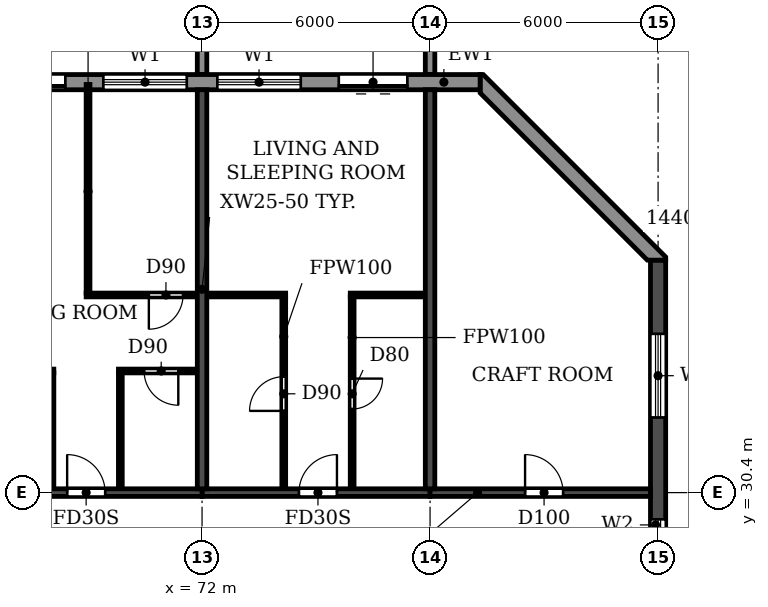
"""IFC4 building model, lengths in metres.
Left out: names, types, materials, properties, quantities, classifications, styles, units other than length and angle.
Written with IfcOpenShell. Run it as: python <this file> out.ifc"""

import sys

from ifc_helpers import new_model, si_unit, direction, frame, frame_2d, origin, place, context, subcontext, project, spatial, polyline, rectangle, outline, extrude, source, transform, mapped, element, fill, save


model = new_model("IFC4")
c1 = context("Model", 3, precision=1e-05, world=origin(), true_north=direction((0.0, 1.0)))
c2 = subcontext(c1, "Body", "Model", "MODEL_VIEW")
j1 = project(units=[si_unit("LENGTHUNIT", "METRE"), si_unit("PLANEANGLEUNIT", "RADIAN")], contexts=[c1])
p1 = place(None, origin())
s1 = spatial("IfcSite", under=j1, at=p1, CompositionType="ELEMENT")
p2 = place(p1, origin())
s2 = spatial("IfcBuilding", under=s1, at=p2, CompositionType="ELEMENT")
p3 = place(p2, frame((0.0, 0.0, 181.8)))
s3 = spatial("IfcBuildingStorey", under=s2, at=p3, CompositionType="ELEMENT", Elevation=181.8)
for number, where, z_axis, x_axis in (
    (1, (72.0, 30.5, 0.0), (0.0, 0.0, 1.0), (0.0, 1.0, 0.0)),
    (2, (78.0, 30.5, 0.0), (0.0, 0.0, 1.0), (0.0, 1.0, 0.0)),
):
    element("IfcWall", number, at=place(p3, frame(where, z_axis=z_axis, x_axis=x_axis)), inside=s3, PredefinedType="SHEAR", context=c2, shape_type="SweptSolid", body=[
        extrude(rectangle(XDim=10.5, YDim=0.25, at=frame_2d((5.25, 0.0))), origin(), (0.0, 0.0, 1.0), 3.08),
    ])
p4 = place(p3, frame((84.0, 4.683, 0.0), z_axis=(0.0, 0.0, 1.0), x_axis=(0.0, 1.0, 0.0)))
e3 = element("IfcWall", 3, at=p4, inside=s3, PredefinedType="SHEAR", context=c2, shape_type="SweptSolid", body=[
    extrude(rectangle(XDim=31.834, YDim=0.4, at=frame_2d((15.917, 0.0))), origin(), (0.0, 0.0, 1.0), 3.08),
])
p5 = place(p4, frame((23.817, 0.0, 0.9)))
e4 = element("IfcOpeningElement", 4, at=p5, cuts=e3, PredefinedType="OPENING", context=c2, shape_type="SweptSolid", body=[
    extrude(rectangle(XDim=1.2, YDim=1.5, at=frame_2d((0.6, 0.75))), frame((0.0, 0.21, 0.0), z_axis=(0.0, -1.0, 0.0), x_axis=(1.0, 0.0, 0.0)), (0.0, 0.0, 1.0), 0.42),
])
p6 = place(p4, frame((8.017, 0.0, 0.9)))
e5 = element("IfcOpeningElement", 5, at=p6, cuts=e3, PredefinedType="OPENING", context=c2, shape_type="SweptSolid", body=[
    extrude(rectangle(XDim=1.2, YDim=1.5, at=frame_2d((0.6, 0.75))), frame((0.0, 0.21, 0.0), z_axis=(0.0, -1.0, 0.0), x_axis=(1.0, 0.0, 0.0)), (0.0, 0.0, 1.0), 0.42),
])
p7 = place(p4, frame((27.694, 0.0, 0.6)))
e6 = element("IfcOpeningElement", 6, at=p7, cuts=e3, PredefinedType="OPENING", context=c2, shape_type="SweptSolid", body=[
    extrude(rectangle(XDim=2.2, YDim=1.8, at=frame_2d((1.1, 0.9))), frame((0.0, 0.21, 0.0), z_axis=(0.0, -1.0, 0.0), x_axis=(1.0, 0.0, 0.0)), (0.0, 0.0, 1.0), 0.42),
])
p8 = place(p4, frame((2.541, 0.0, 0.6)))
e7 = element("IfcOpeningElement", 7, at=p8, cuts=e3, PredefinedType="OPENING", context=c2, shape_type="SweptSolid", body=[
    extrude(rectangle(XDim=2.2, YDim=1.8, at=frame_2d((1.1, 0.9))), frame((0.0, 0.21, 0.0), z_axis=(0.0, -1.0, 0.0), x_axis=(1.0, 0.0, 0.0)), (0.0, 0.0, 1.0), 0.42),
])
p9 = place(p4, frame((15.917, 0.0, 0.9)))
e8 = element("IfcOpeningElement", 8, at=p9, cuts=e3, PredefinedType="OPENING", context=c2, shape_type="SweptSolid", body=[
    extrude(rectangle(XDim=1.2, YDim=1.5, at=frame_2d((0.6, 0.75))), frame((0.0, 0.21, 0.0), z_axis=(0.0, -1.0, 0.0), x_axis=(1.0, 0.0, 0.0)), (0.0, 0.0, 1.0), 0.42),
])
p10 = place(p3, frame((66.0, 30.4, 0.0), z_axis=(0.0, 0.0, 1.0), x_axis=(1.0, 0.0, 0.0)))
e9 = element("IfcWall", 9, at=p10, inside=s3, PredefinedType="SHEAR", context=c2, shape_type="SweptSolid", body=[
    extrude(rectangle(XDim=6.0, YDim=0.2, at=frame_2d((3.0, 0.0))), origin(), (0.0, 0.0, 1.0), 2.48),
])
p11 = place(p10, frame((2.45, 0.0, 0.0)))
e10 = element("IfcOpeningElement", 10, at=p11, cuts=e9, PredefinedType="OPENING", context=c2, shape_type="SweptSolid", body=[
    extrude(rectangle(XDim=1.0, YDim=2.1, at=frame_2d((0.5, 1.05))), frame((0.0, 0.11, 0.0), z_axis=(0.0, -1.0, 0.0), x_axis=(1.0, 0.0, 0.0)), (0.0, 0.0, 1.0), 0.22),
])
p12 = place(p3, frame((72.0, 30.4, 0.0), z_axis=(0.0, 0.0, 1.0), x_axis=(1.0, 0.0, 0.0)))
e11 = element("IfcWall", 11, at=p12, inside=s3, PredefinedType="SHEAR", context=c2, shape_type="SweptSolid", body=[
    extrude(rectangle(XDim=6.0, YDim=0.2, at=frame_2d((3.0, 0.0))), origin(), (0.0, 0.0, 1.0), 2.48),
])
p13 = place(p12, frame((2.55, 0.0, 0.0)))
e12 = element("IfcOpeningElement", 12, at=p13, cuts=e11, PredefinedType="OPENING", context=c2, shape_type="SweptSolid", body=[
    extrude(rectangle(XDim=1.0, YDim=2.1, at=frame_2d((0.5, 1.05))), frame((0.0, 0.11, 0.0), z_axis=(0.0, -1.0, 0.0), x_axis=(1.0, 0.0, 0.0)), (0.0, 0.0, 1.0), 0.22),
])
p14 = place(p3, frame((78.0, 30.4, 0.0), z_axis=(0.0, 0.0, 1.0), x_axis=(1.0, 0.0, 0.0)))
e13 = element("IfcWall", 13, at=p14, inside=s3, PredefinedType="SHEAR", context=c2, shape_type="SweptSolid", body=[
    extrude(rectangle(XDim=5.8, YDim=0.2, at=frame_2d((2.9, 0.0))), origin(), (0.0, 0.0, 1.0), 2.48),
])
p15 = place(p14, frame((2.5, 0.0, 0.0)))
e14 = element("IfcOpeningElement", 14, at=p15, cuts=e13, PredefinedType="OPENING", context=c2, shape_type="SweptSolid", body=[
    extrude(rectangle(XDim=1.0, YDim=2.1, at=frame_2d((0.5, 1.05))), frame((0.0, 0.11, 0.0), z_axis=(0.0, -1.0, 0.0), x_axis=(1.0, 0.0, 0.0)), (0.0, 0.0, 1.0), 0.22),
])
p16 = place(p3, origin())
e15 = element("IfcWall", 15, at=p16, inside=s3, PredefinedType="STANDARD", context=c2, shape_type="SweptSolid", body=[
    extrude(outline(polyline([(84.2, 36.517), (84.2, 36.6), (79.4, 41.4), (79.317, 41.4), (79.317, 40.917), (83.717, 36.517), (84.2, 36.517)])), origin(), (0.0, 0.0, 1.0), 3.08),
])
p17 = place(p3, frame((79.317, 41.2, 0.0), z_axis=(0.0, 0.0, 1.0), x_axis=(-1.0, 0.0, 0.0)))
e16 = element("IfcWall", 16, at=p17, inside=s3, PredefinedType="STANDARD", context=c2, shape_type="SweptSolid", body=[
    extrude(rectangle(XDim=56.634, YDim=0.4, at=frame_2d((28.317, 0.0))), origin(), (0.0, 0.0, 1.0), 3.08),
])
p18 = place(p17, frame((52.917, 0.0, 0.0)))
e17 = element("IfcOpeningElement", 17, at=p18, cuts=e16, PredefinedType="OPENING", context=c2, shape_type="SweptSolid", body=[
    extrude(rectangle(XDim=1.8, YDim=2.4, at=frame_2d((0.9, 1.2))), frame((0.0, 0.21, 0.0), z_axis=(0.0, -1.0, 0.0), x_axis=(1.0, 0.0, 0.0)), (0.0, 0.0, 1.0), 0.42),
])
p19 = place(p17, frame((49.717, 0.0, 0.9)))
e18 = element("IfcOpeningElement", 18, at=p19, cuts=e16, PredefinedType="OPENING", context=c2, shape_type="SweptSolid", body=[
    extrude(rectangle(XDim=2.2, YDim=1.5, at=frame_2d((1.1, 0.75))), frame((0.0, 0.21, 0.0), z_axis=(0.0, -1.0, 0.0), x_axis=(1.0, 0.0, 0.0)), (0.0, 0.0, 1.0), 0.42),
])
p20 = place(p17, frame((46.717, 0.0, 0.9)))
e19 = element("IfcOpeningElement", 19, at=p20, cuts=e16, PredefinedType="OPENING", context=c2, shape_type="SweptSolid", body=[
    extrude(rectangle(XDim=2.2, YDim=1.5, at=frame_2d((1.1, 0.75))), frame((0.0, 0.21, 0.0), z_axis=(0.0, -1.0, 0.0), x_axis=(1.0, 0.0, 0.0)), (0.0, 0.0, 1.0), 0.42),
])
p21 = place(p17, frame((43.917, 0.0, 0.0)))
e20 = element("IfcOpeningElement", 20, at=p21, cuts=e16, PredefinedType="OPENING", context=c2, shape_type="SweptSolid", body=[
    extrude(rectangle(XDim=1.8, YDim=2.4, at=frame_2d((0.9, 1.2))), frame((0.0, 0.21, 0.0), z_axis=(0.0, -1.0, 0.0), x_axis=(1.0, 0.0, 0.0)), (0.0, 0.0, 1.0), 0.42),
])
p22 = place(p17, frame((40.717, 0.0, 0.9)))
e21 = element("IfcOpeningElement", 21, at=p22, cuts=e16, PredefinedType="OPENING", context=c2, shape_type="SweptSolid", body=[
    extrude(rectangle(XDim=2.2, YDim=1.5, at=frame_2d((1.1, 0.75))), frame((0.0, 0.21, 0.0), z_axis=(0.0, -1.0, 0.0), x_axis=(1.0, 0.0, 0.0)), (0.0, 0.0, 1.0), 0.42),
])
p23 = place(p17, frame((37.717, 0.0, 0.9)))
e22 = element("IfcOpeningElement", 22, at=p23, cuts=e16, PredefinedType="OPENING", context=c2, shape_type="SweptSolid", body=[
    extrude(rectangle(XDim=2.2, YDim=1.5, at=frame_2d((1.1, 0.75))), frame((0.0, 0.21, 0.0), z_axis=(0.0, -1.0, 0.0), x_axis=(1.0, 0.0, 0.0)), (0.0, 0.0, 1.0), 0.42),
])
p24 = place(p17, frame((34.917, 0.0, 0.0)))
e23 = element("IfcOpeningElement", 23, at=p24, cuts=e16, PredefinedType="OPENING", context=c2, shape_type="SweptSolid", body=[
    extrude(rectangle(XDim=1.8, YDim=2.4, at=frame_2d((0.9, 1.2))), frame((0.0, 0.21, 0.0), z_axis=(0.0, -1.0, 0.0), x_axis=(1.0, 0.0, 0.0)), (0.0, 0.0, 1.0), 0.42),
])
p25 = place(p17, frame((31.717, 0.0, 0.9)))
e24 = element("IfcOpeningElement", 24, at=p25, cuts=e16, PredefinedType="OPENING", context=c2, shape_type="SweptSolid", body=[
    extrude(rectangle(XDim=2.2, YDim=1.5, at=frame_2d((1.1, 0.75))), frame((0.0, 0.21, 0.0), z_axis=(0.0, -1.0, 0.0), x_axis=(1.0, 0.0, 0.0)), (0.0, 0.0, 1.0), 0.42),
])
p26 = place(p17, frame((28.717, 0.0, 0.9)))
e25 = element("IfcOpeningElement", 25, at=p26, cuts=e16, PredefinedType="OPENING", context=c2, shape_type="SweptSolid", body=[
    extrude(rectangle(XDim=2.2, YDim=1.5, at=frame_2d((1.1, 0.75))), frame((0.0, 0.21, 0.0), z_axis=(0.0, -1.0, 0.0), x_axis=(1.0, 0.0, 0.0)), (0.0, 0.0, 1.0), 0.42),
])
p27 = place(p17, frame((25.717, 0.0, 0.9)))
e26 = element("IfcOpeningElement", 26, at=p27, cuts=e16, PredefinedType="OPENING", context=c2, shape_type="SweptSolid", body=[
    extrude(rectangle(XDim=2.2, YDim=1.5, at=frame_2d((1.1, 0.75))), frame((0.0, 0.21, 0.0), z_axis=(0.0, -1.0, 0.0), x_axis=(1.0, 0.0, 0.0)), (0.0, 0.0, 1.0), 0.42),
])
p28 = place(p17, frame((22.917, 0.0, 0.0)))
e27 = element("IfcOpeningElement", 27, at=p28, cuts=e16, PredefinedType="OPENING", context=c2, shape_type="SweptSolid", body=[
    extrude(rectangle(XDim=1.8, YDim=2.4, at=frame_2d((0.9, 1.2))), frame((0.0, 0.21, 0.0), z_axis=(0.0, -1.0, 0.0), x_axis=(1.0, 0.0, 0.0)), (0.0, 0.0, 1.0), 0.42),
])
p29 = place(p17, frame((19.717, 0.0, 0.9)))
e28 = element("IfcOpeningElement", 28, at=p29, cuts=e16, PredefinedType="OPENING", context=c2, shape_type="SweptSolid", body=[
    extrude(rectangle(XDim=2.2, YDim=1.5, at=frame_2d((1.1, 0.75))), frame((0.0, 0.21, 0.0), z_axis=(0.0, -1.0, 0.0), x_axis=(1.0, 0.0, 0.0)), (0.0, 0.0, 1.0), 0.42),
])
p30 = place(p17, frame((16.917, 0.0, 0.0)))
e29 = element("IfcOpeningElement", 29, at=p30, cuts=e16, PredefinedType="OPENING", context=c2, shape_type="SweptSolid", body=[
    extrude(rectangle(XDim=1.8, YDim=2.4, at=frame_2d((0.9, 1.2))), frame((0.0, 0.21, 0.0), z_axis=(0.0, -1.0, 0.0), x_axis=(1.0, 0.0, 0.0)), (0.0, 0.0, 1.0), 0.42),
])
p31 = place(p17, frame((13.717, 0.0, 0.9)))
e30 = element("IfcOpeningElement", 30, at=p31, cuts=e16, PredefinedType="OPENING", context=c2, shape_type="SweptSolid", body=[
    extrude(rectangle(XDim=2.2, YDim=1.5, at=frame_2d((1.1, 0.75))), frame((0.0, 0.21, 0.0), z_axis=(0.0, -1.0, 0.0), x_axis=(1.0, 0.0, 0.0)), (0.0, 0.0, 1.0), 0.42),
])
p32 = place(p17, frame((10.917, 0.0, 0.0)))
e31 = element("IfcOpeningElement", 31, at=p32, cuts=e16, PredefinedType="OPENING", context=c2, shape_type="SweptSolid", body=[
    extrude(rectangle(XDim=1.8, YDim=2.4, at=frame_2d((0.9, 1.2))), frame((0.0, 0.21, 0.0), z_axis=(0.0, -1.0, 0.0), x_axis=(1.0, 0.0, 0.0)), (0.0, 0.0, 1.0), 0.42),
])
p33 = place(p17, frame((7.717, 0.0, 0.9)))
e32 = element("IfcOpeningElement", 32, at=p33, cuts=e16, PredefinedType="OPENING", context=c2, shape_type="SweptSolid", body=[
    extrude(rectangle(XDim=2.2, YDim=1.5, at=frame_2d((1.1, 0.75))), frame((0.0, 0.21, 0.0), z_axis=(0.0, -1.0, 0.0), x_axis=(1.0, 0.0, 0.0)), (0.0, 0.0, 1.0), 0.42),
])
p34 = place(p17, frame((4.717, 0.0, 0.9)))
e33 = element("IfcOpeningElement", 33, at=p34, cuts=e16, PredefinedType="OPENING", context=c2, shape_type="SweptSolid", body=[
    extrude(rectangle(XDim=2.2, YDim=1.5, at=frame_2d((1.1, 0.75))), frame((0.0, 0.21, 0.0), z_axis=(0.0, -1.0, 0.0), x_axis=(1.0, 0.0, 0.0)), (0.0, 0.0, 1.0), 0.42),
])
p35 = place(p17, frame((1.917, 0.0, 0.0)))
e34 = element("IfcOpeningElement", 34, at=p35, cuts=e16, PredefinedType="OPENING", context=c2, shape_type="SweptSolid", body=[
    extrude(rectangle(XDim=1.8, YDim=2.4, at=frame_2d((0.9, 1.2))), frame((0.0, 0.21, 0.0), z_axis=(0.0, -1.0, 0.0), x_axis=(1.0, 0.0, 0.0)), (0.0, 0.0, 1.0), 0.42),
])
m1 = source(origin(), c2, "Body", "SweptSolid", [
    extrude(outline(polyline([(0.0, 0.0), (0.25, 0.0), (0.25, 3.1), (0.0, 3.1), (0.0, 0.0)])), origin(), (0.0, 0.0, 1.0), 3.1),
])
for number, where in (
    (35, (71.875, 41.4, 0.0)),
    (36, (77.875, 41.4, 0.0)),
):
    element("IfcWall", number, at=place(p3, frame(where)), inside=s3, PredefinedType="STANDARD", context=c2, shape_type="MappedRepresentation", body=[
        mapped(m1, transform((0.0, 0.0, 0.0))),
    ])
p36 = place(p3, frame((66.135, 33.6, 0.0), z_axis=(0.0, 0.0, 1.0), x_axis=(1.0, 0.0, 0.0)))
e37 = element("IfcWall", 37, at=p36, inside=s3, PredefinedType="PARTITIONING", context=c2, shape_type="SweptSolid", body=[
    extrude(rectangle(XDim=1.965, YDim=0.1, at=frame_2d((0.982, 0.0))), origin(), (0.0, 0.0, 1.0), 3.08),
])
p37 = place(p36, frame((0.49, 0.0, 0.0)))
e38 = element("IfcOpeningElement", 38, at=p37, cuts=e37, PredefinedType="OPENING", context=c2, shape_type="SweptSolid", body=[
    extrude(rectangle(XDim=0.8, YDim=2.1, at=frame_2d((0.4, 1.05))), frame((0.0, 0.06, 0.0), z_axis=(0.0, -1.0, 0.0), x_axis=(1.0, 0.0, 0.0)), (0.0, 0.0, 1.0), 0.12),
])
p38 = place(p3, frame((69.8, 33.6, 0.0), z_axis=(0.0, 0.0, 1.0), x_axis=(1.0, 0.0, 0.0)))
e39 = element("IfcWall", 39, at=p38, inside=s3, PredefinedType="PARTITIONING", context=c2, shape_type="SweptSolid", body=[
    extrude(rectangle(XDim=2.065, YDim=0.1, at=frame_2d((1.032, 0.0))), origin(), (0.0, 0.0, 1.0), 3.08),
])
p39 = place(p38, frame((0.675, 0.0, 0.0)))
e40 = element("IfcOpeningElement", 40, at=p39, cuts=e39, PredefinedType="OPENING", context=c2, shape_type="SweptSolid", body=[
    extrude(rectangle(XDim=0.9, YDim=2.1, at=frame_2d((0.45, 1.05))), frame((0.0, 0.06, 0.0), z_axis=(0.0, -1.0, 0.0), x_axis=(1.0, 0.0, 0.0)), (0.0, 0.0, 1.0), 0.12),
])
p40 = place(p3, frame((68.95, 35.6, 0.0), z_axis=(0.0, 0.0, 1.0), x_axis=(1.0, 0.0, 0.0)))
e41 = element("IfcWall", 41, at=p40, inside=s3, PredefinedType="PARTITIONING", context=c2, shape_type="SweptSolid", body=[
    extrude(rectangle(XDim=2.915, YDim=0.1, at=frame_2d((1.458, 0.0))), origin(), (0.0, 0.0, 1.0), 3.08),
])
p41 = place(p40, frame((1.65, 0.0, 0.0)))
e42 = element("IfcOpeningElement", 42, at=p41, cuts=e41, PredefinedType="OPENING", context=c2, shape_type="SweptSolid", body=[
    extrude(rectangle(XDim=0.9, YDim=2.1, at=frame_2d((0.45, 1.05))), frame((0.0, 0.06, 0.0), z_axis=(0.0, -1.0, 0.0), x_axis=(1.0, 0.0, 0.0)), (0.0, 0.0, 1.0), 0.12),
])
p42 = place(p3, frame((72.135, 35.6, 0.0), z_axis=(0.0, 0.0, 1.0), x_axis=(1.0, 0.0, 0.0)))
e43 = element("IfcWall", 43, at=p42, inside=s3, PredefinedType="PARTITIONING", context=c2, shape_type="SweptSolid", body=[
    extrude(rectangle(XDim=2.065, YDim=0.1, at=frame_2d((1.032, 0.0))), origin(), (0.0, 0.0, 1.0), 3.08),
])
p43 = place(p3, frame((75.9, 35.6, 0.0), z_axis=(0.0, 0.0, 1.0), x_axis=(1.0, 0.0, 0.0)))
e44 = element("IfcWall", 44, at=p43, inside=s3, PredefinedType="PARTITIONING", context=c2, shape_type="SweptSolid", body=[
    extrude(rectangle(XDim=1.965, YDim=0.1, at=frame_2d((0.982, 0.0))), origin(), (0.0, 0.0, 1.0), 3.08),
])
p44 = place(p3, frame((68.05, 30.51, 0.0), z_axis=(0.0, 0.0, 1.0), x_axis=(0.0, 1.0, 0.0)))
e45 = element("IfcWall", 45, at=p44, inside=s3, PredefinedType="PARTITIONING", context=c2, shape_type="SweptSolid", body=[
    extrude(rectangle(XDim=3.04, YDim=0.1, at=frame_2d((1.52, 0.0))), origin(), (0.0, 0.0, 1.0), 3.08),
])
p45 = place(p3, frame((69.0, 35.65, 0.0), z_axis=(0.0, 0.0, 1.0), x_axis=(0.0, 1.0, 0.0)))
e46 = element("IfcWall", 46, at=p45, inside=s3, PredefinedType="PARTITIONING", context=c2, shape_type="SweptSolid", body=[
    extrude(rectangle(XDim=5.49, YDim=0.1, at=frame_2d((2.745, 0.0))), origin(), (0.0, 0.0, 1.0), 3.08),
])
p46 = place(p3, frame((69.85, 30.51, 0.0), z_axis=(0.0, 0.0, 1.0), x_axis=(0.0, 1.0, 0.0)))
e47 = element("IfcWall", 47, at=p46, inside=s3, PredefinedType="PARTITIONING", context=c2, shape_type="SweptSolid", body=[
    extrude(rectangle(XDim=3.04, YDim=0.1, at=frame_2d((1.52, 0.0))), origin(), (0.0, 0.0, 1.0), 3.08),
])
p47 = place(p3, frame((74.15, 30.51, 0.0), z_axis=(0.0, 0.0, 1.0), x_axis=(0.0, 1.0, 0.0)))
e48 = element("IfcWall", 48, at=p47, inside=s3, PredefinedType="PARTITIONING", context=c2, shape_type="SweptSolid", body=[
    extrude(rectangle(XDim=5.04, YDim=0.1, at=frame_2d((2.52, 0.0))), origin(), (0.0, 0.0, 1.0), 3.08),
])
p48 = place(p47, frame((2.04, 0.0, 0.0)))
e49 = element("IfcOpeningElement", 49, at=p48, cuts=e48, PredefinedType="OPENING", context=c2, shape_type="SweptSolid", body=[
    extrude(rectangle(XDim=0.9, YDim=2.1, at=frame_2d((0.45, 1.05))), frame((0.0, 0.06, 0.0), z_axis=(0.0, -1.0, 0.0), x_axis=(1.0, 0.0, 0.0)), (0.0, 0.0, 1.0), 0.12),
])
p49 = place(p3, frame((75.95, 30.51, 0.0), z_axis=(0.0, 0.0, 1.0), x_axis=(0.0, 1.0, 0.0)))
e50 = element("IfcWall", 50, at=p49, inside=s3, PredefinedType="PARTITIONING", context=c2, shape_type="SweptSolid", body=[
    extrude(rectangle(XDim=5.04, YDim=0.1, at=frame_2d((2.52, 0.0))), origin(), (0.0, 0.0, 1.0), 3.08),
])
p50 = place(p49, frame((2.09, 0.0, 0.0)))
e51 = element("IfcOpeningElement", 51, at=p50, cuts=e50, PredefinedType="OPENING", context=c2, shape_type="SweptSolid", body=[
    extrude(rectangle(XDim=0.8, YDim=2.1, at=frame_2d((0.4, 1.05))), frame((0.0, 0.06, 0.0), z_axis=(0.0, -1.0, 0.0), x_axis=(1.0, 0.0, 0.0)), (0.0, 0.0, 1.0), 0.12),
])
p51 = place(p5, origin())
e52 = element("IfcWindow", 52, at=p51, inside=s3, PartitioningType="SINGLE_PANEL", PredefinedType="WINDOW", context=c2, shape_type="SweptSolid", body=[
    extrude(rectangle(XDim=1.2, YDim=1.5, at=frame_2d((0.6, 0.75))), frame((0.0, 0.03, 0.0), z_axis=(0.0, -1.0, 0.0), x_axis=(1.0, 0.0, 0.0)), (0.0, 0.0, 1.0), 0.06),
])
fill(e4, e52)
p52 = place(p7, origin())
e53 = element("IfcWindow", 53, at=p52, inside=s3, PartitioningType="DOUBLE_PANEL_HORIZONTAL", PredefinedType="WINDOW", context=c2, shape_type="SweptSolid", body=[
    extrude(rectangle(XDim=2.2, YDim=1.8, at=frame_2d((1.1, 0.9))), frame((0.0, 0.03, 0.0), z_axis=(0.0, -1.0, 0.0), x_axis=(1.0, 0.0, 0.0)), (0.0, 0.0, 1.0), 0.06),
])
fill(e6, e53)
p53 = place(p32, origin())
e54 = element("IfcDoor", 54, at=p53, inside=s3, OperationType="DOUBLE_DOOR_SLIDING", PredefinedType="DOOR", context=c2, shape_type="SweptSolid", body=[
    extrude(rectangle(XDim=1.8, YDim=2.4, at=frame_2d((0.9, 1.2))), frame((0.0, 0.025, 0.0), z_axis=(0.0, -1.0, 0.0), x_axis=(1.0, 0.0, 0.0)), (0.0, 0.0, 1.0), 0.05),
])
fill(e31, e54)
p54 = place(p33, origin())
e55 = element("IfcWindow", 55, at=p54, inside=s3, PartitioningType="DOUBLE_PANEL_HORIZONTAL", PredefinedType="WINDOW", context=c2, shape_type="SweptSolid", body=[
    extrude(rectangle(XDim=2.2, YDim=1.5, at=frame_2d((1.1, 0.75))), frame((0.0, 0.03, 0.0), z_axis=(0.0, -1.0, 0.0), x_axis=(1.0, 0.0, 0.0)), (0.0, 0.0, 1.0), 0.06),
])
fill(e32, e55)
p55 = place(p34, origin())
e56 = element("IfcWindow", 56, at=p55, inside=s3, PartitioningType="DOUBLE_PANEL_HORIZONTAL", PredefinedType="WINDOW", context=c2, shape_type="SweptSolid", body=[
    extrude(rectangle(XDim=2.2, YDim=1.5, at=frame_2d((1.1, 0.75))), frame((0.0, 0.03, 0.0), z_axis=(0.0, -1.0, 0.0), x_axis=(1.0, 0.0, 0.0)), (0.0, 0.0, 1.0), 0.06),
])
fill(e33, e56)
p56 = place(p35, origin())
e57 = element("IfcDoor", 57, at=p56, inside=s3, OperationType="DOUBLE_DOOR_SLIDING", PredefinedType="DOOR", context=c2, shape_type="SweptSolid", body=[
    extrude(rectangle(XDim=1.8, YDim=2.4, at=frame_2d((0.9, 1.2))), frame((0.0, 0.025, 0.0), z_axis=(0.0, -1.0, 0.0), x_axis=(1.0, 0.0, 0.0)), (0.0, 0.0, 1.0), 0.05),
])
fill(e34, e57)
p57 = place(p11, origin())
e58 = element("IfcDoor", 58, at=p57, inside=s3, OperationType="SINGLE_SWING_LEFT", PredefinedType="DOOR", context=c2, shape_type="SweptSolid", body=[
    extrude(rectangle(XDim=1.0, YDim=2.1, at=frame_2d((0.5, 1.05))), frame((0.0, 0.025, 0.0), z_axis=(0.0, -1.0, 0.0), x_axis=(1.0, 0.0, 0.0)), (0.0, 0.0, 1.0), 0.05),
])
fill(e10, e58)
p58 = place(p39, frame((0.9, 0.0, 0.0), z_axis=(0.0, 0.0, 1.0), x_axis=(-1.0, 0.0, 0.0)))
e59 = element("IfcDoor", 59, at=p58, inside=s3, OperationType="SINGLE_SWING_LEFT", PredefinedType="DOOR", context=c2, shape_type="SweptSolid", body=[
    extrude(rectangle(XDim=0.9, YDim=2.1, at=frame_2d((0.45, 1.05))), frame((0.0, 0.025, 0.0), z_axis=(0.0, -1.0, 0.0), x_axis=(1.0, 0.0, 0.0)), (0.0, 0.0, 1.0), 0.05),
])
fill(e40, e59)
p59 = place(p41, frame((0.9, 0.0, 0.0), z_axis=(0.0, 0.0, 1.0), x_axis=(-1.0, 0.0, 0.0)))
e60 = element("IfcDoor", 60, at=p59, inside=s3, OperationType="SINGLE_SWING_RIGHT", PredefinedType="DOOR", context=c2, shape_type="SweptSolid", body=[
    extrude(rectangle(XDim=0.9, YDim=2.1, at=frame_2d((0.45, 1.05))), frame((0.0, 0.025, 0.0), z_axis=(0.0, -1.0, 0.0), x_axis=(1.0, 0.0, 0.0)), (0.0, 0.0, 1.0), 0.05),
])
fill(e42, e60)
p60 = place(p48, origin())
e61 = element("IfcDoor", 61, at=p60, inside=s3, OperationType="SINGLE_SWING_LEFT", PredefinedType="DOOR", context=c2, shape_type="SweptSolid", body=[
    extrude(rectangle(XDim=0.9, YDim=2.1, at=frame_2d((0.45, 1.05))), frame((0.0, 0.025, 0.0), z_axis=(0.0, -1.0, 0.0), x_axis=(1.0, 0.0, 0.0)), (0.0, 0.0, 1.0), 0.05),
])
fill(e49, e61)
p61 = place(p13, origin())
e62 = element("IfcDoor", 62, at=p61, inside=s3, OperationType="SINGLE_SWING_RIGHT", PredefinedType="DOOR", context=c2, shape_type="SweptSolid", body=[
    extrude(rectangle(XDim=1.0, YDim=2.1, at=frame_2d((0.5, 1.05))), frame((0.0, 0.025, 0.0), z_axis=(0.0, -1.0, 0.0), x_axis=(1.0, 0.0, 0.0)), (0.0, 0.0, 1.0), 0.05),
])
fill(e12, e62)
p62 = place(p50, frame((0.8, 0.0, 0.0), z_axis=(0.0, 0.0, 1.0), x_axis=(-1.0, 0.0, 0.0)))
e63 = element("IfcDoor", 63, at=p62, inside=s3, OperationType="SINGLE_SWING_LEFT", PredefinedType="DOOR", context=c2, shape_type="SweptSolid", body=[
    extrude(rectangle(XDim=0.8, YDim=2.1, at=frame_2d((0.4, 1.05))), frame((0.0, 0.025, 0.0), z_axis=(0.0, -1.0, 0.0), x_axis=(1.0, 0.0, 0.0)), (0.0, 0.0, 1.0), 0.05),
])
fill(e51, e63)
p63 = place(p15, origin())
e64 = element("IfcDoor", 64, at=p63, inside=s3, OperationType="SINGLE_SWING_LEFT", PredefinedType="DOOR", context=c2, shape_type="SweptSolid", body=[
    extrude(rectangle(XDim=1.0, YDim=2.1, at=frame_2d((0.5, 1.05))), frame((0.0, 0.025, 0.0), z_axis=(0.0, -1.0, 0.0), x_axis=(1.0, 0.0, 0.0)), (0.0, 0.0, 1.0), 0.05),
])
fill(e14, e64)
save(model, sys.argv[1])
